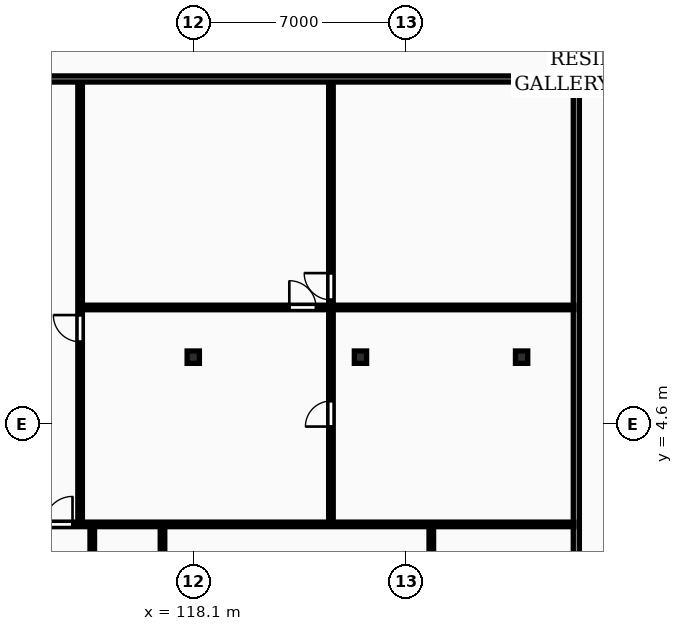
"""IFC4 building model, lengths in metres.
Left out: names, types, materials, properties, quantities, classifications, styles, units other than length and angle.
Written with IfcOpenShell. Run it as: python <this file> out.ifc"""

import sys

from ifc_helpers import new_model, si_unit, direction, frame, frame_2d, origin, origin_2d, place, context, subcontext, project, spatial, rectangle, i_section, extrude, element, fill, save


model = new_model("IFC4")
c1 = context("Model", 3, precision=1e-05, world=origin(), true_north=direction((0.0, 1.0)))
c2 = subcontext(c1, "Body", "Model", "MODEL_VIEW")
j1 = project(units=[si_unit("LENGTHUNIT", "METRE"), si_unit("PLANEANGLEUNIT", "RADIAN")], contexts=[c1])
p1 = place(None, origin())
s1 = spatial("IfcSite", under=j1, at=p1, CompositionType="ELEMENT")
p2 = place(p1, origin())
s2 = spatial("IfcBuilding", under=s1, at=p2, CompositionType="ELEMENT")
p3 = place(p2, frame((0.0, 0.0, 146.5)))
s3 = spatial("IfcBuildingStorey", under=s2, at=p3, CompositionType="ELEMENT", Elevation=146.5)
for number, where, z_axis, x_axis in (
    (1, (118.1, 6.8, 0.0), (0.0, 0.0, 1.0), (1.0, 0.0, 0.0)),
    (2, (123.6, 6.8, 0.0), (0.0, 0.0, 1.0), (1.0, 0.0, 0.0)),
    (3, (128.9, 6.8, 0.0), (0.0, 0.0, 1.0), (1.0, 0.0, 0.0)),
):
    element("IfcColumn", number, at=place(p3, frame(where, z_axis=z_axis, x_axis=x_axis)), inside=s3, PredefinedType="COLUMN", context=c2, shape_type="SweptSolid", body=[
        extrude(i_section(OverallWidth=0.403, OverallDepth=0.406, WebThickness=0.027, FlangeThickness=0.043, FilletRadius=0.015, at=origin_2d()), origin(), (0.0, 0.0, 1.0), 3.6),
    ])
p4 = place(p3, frame((130.7, -8.7, 0.0), z_axis=(0.0, 0.0, 1.0), x_axis=(0.0, 1.0, 0.0)))
e4 = element("IfcWall", 4, at=p4, inside=s3, PredefinedType="PARTITIONING", context=c2, shape_type="SweptSolid", body=[
    extrude(rectangle(XDim=24.57, YDim=0.2, at=frame_2d((12.285, 0.0))), origin(), (0.0, 0.0, 1.0), 3.31),
])
p5 = place(p3, frame((122.629, 1.34, 0.0), z_axis=(0.0, 0.0, 1.0), x_axis=(0.0, 1.0, 0.0)))
e5 = element("IfcWall", 5, at=p5, inside=s3, PredefinedType="PARTITIONING", context=c2, shape_type="SweptSolid", body=[
    extrude(rectangle(XDim=14.55, YDim=0.15, at=frame_2d((7.275, 0.0))), origin(), (0.0, 0.0, 1.0), 3.31),
])
p6 = place(p5, frame((3.177, 0.0, 0.0)))
e6 = element("IfcOpeningElement", 6, at=p6, cuts=e5, PredefinedType="OPENING", context=c2, shape_type="SweptSolid", body=[
    extrude(rectangle(XDim=0.84, YDim=2.04, at=frame_2d((0.42, 1.02))), frame((0.0, 0.085, 0.0), z_axis=(0.0, -1.0, 0.0), x_axis=(1.0, 0.0, 0.0)), (0.0, 0.0, 1.0), 0.17),
])
p7 = place(p5, frame((7.345, 0.0, 0.0)))
e7 = element("IfcOpeningElement", 7, at=p7, cuts=e5, PredefinedType="OPENING", context=c2, shape_type="SweptSolid", body=[
    extrude(rectangle(XDim=0.88, YDim=2.06, at=frame_2d((0.44, 1.03))), frame((0.0, 0.085, 0.0), z_axis=(0.0, -1.0, 0.0), x_axis=(1.0, 0.0, 0.0)), (0.0, 0.0, 1.0), 0.17),
])
p8 = place(p3, frame((114.438, 8.435, 0.0), z_axis=(0.0, 0.0, 1.0), x_axis=(1.0, 0.0, 0.0)))
e8 = element("IfcWall", 8, at=p8, inside=s3, PredefinedType="PARTITIONING", context=c2, shape_type="SweptSolid", body=[
    extrude(rectangle(XDim=16.182, YDim=0.15, at=frame_2d((8.091, 0.0))), origin(), (0.0, 0.0, 1.0), 3.31),
])
p9 = place(p8, frame((6.821, 0.0, 0.0)))
e9 = element("IfcOpeningElement", 9, at=p9, cuts=e8, PredefinedType="OPENING", context=c2, shape_type="SweptSolid", body=[
    extrude(rectangle(XDim=0.88, YDim=2.06, at=frame_2d((0.44, 1.03))), frame((0.0, 0.085, 0.0), z_axis=(0.0, -1.0, 0.0), x_axis=(1.0, 0.0, 0.0)), (0.0, 0.0, 1.0), 0.17),
])
p10 = place(p3, frame((114.378, 1.34, 0.0), z_axis=(0.0, 0.0, 1.0), x_axis=(0.0, 1.0, 0.0)))
e10 = element("IfcWall", 10, at=p10, inside=s3, PredefinedType="PARTITIONING", context=c2, shape_type="SweptSolid", body=[
    extrude(rectangle(XDim=14.55, YDim=0.15, at=frame_2d((7.275, 0.0))), origin(), (0.0, 0.0, 1.0), 3.31),
])
p11 = place(p10, frame((5.965, 0.0, 0.0)))
e11 = element("IfcOpeningElement", 11, at=p11, cuts=e10, PredefinedType="OPENING", context=c2, shape_type="SweptSolid", body=[
    extrude(rectangle(XDim=0.88, YDim=2.06, at=frame_2d((0.44, 1.03))), frame((0.0, 0.085, 0.0), z_axis=(0.0, -1.0, 0.0), x_axis=(1.0, 0.0, 0.0)), (0.0, 0.0, 1.0), 0.17),
])
p12 = place(p3, frame((117.088, -1.43, 0.0), z_axis=(0.0, 0.0, 1.0), x_axis=(0.0, 1.0, 0.0)))
e12 = element("IfcWall", 12, at=p12, inside=s3, PredefinedType="PARTITIONING", context=c2, shape_type="SweptSolid", body=[
    extrude(rectangle(XDim=2.69, YDim=0.15, at=frame_2d((1.345, 0.0))), origin(), (0.0, 0.0, 1.0), 3.31),
])
p13 = place(p3, frame((114.778, -8.7, 0.0), z_axis=(0.0, 0.0, 1.0), x_axis=(0.0, 1.0, 0.0)))
e13 = element("IfcWall", 13, at=p13, inside=s3, PredefinedType="PARTITIONING", context=c2, shape_type="SweptSolid", body=[
    extrude(rectangle(XDim=9.96, YDim=0.15, at=frame_2d((4.98, 0.0))), origin(), (0.0, 0.0, 1.0), 3.31),
])
p14 = place(p13, frame((5.22, 0.0, 0.0)))
e14 = element("IfcOpeningElement", 14, at=p14, cuts=e13, PredefinedType="OPENING", context=c2, shape_type="SweptSolid", body=[
    extrude(rectangle(XDim=0.92, YDim=2.08, at=frame_2d((0.46, 1.04))), frame((0.0, 0.085, 0.0), z_axis=(0.0, -1.0, 0.0), x_axis=(1.0, 0.0, 0.0)), (0.0, 0.0, 1.0), 0.17),
])
p15 = place(p3, frame((125.93, -1.43, 0.0), z_axis=(0.0, 0.0, 1.0), x_axis=(0.0, 1.0, 0.0)))
e15 = element("IfcWall", 15, at=p15, inside=s3, PredefinedType="PARTITIONING", context=c2, shape_type="SweptSolid", body=[
    extrude(rectangle(XDim=2.69, YDim=0.15, at=frame_2d((1.345, 0.0))), origin(), (0.0, 0.0, 1.0), 3.31),
])
p16 = place(p3, frame((110.488, 1.3, 0.0), z_axis=(0.0, 0.0, 1.0), x_axis=(1.0, 0.0, 0.0)))
e16 = element("IfcWall", 16, at=p16, inside=s3, PredefinedType="PARTITIONING", context=c2, shape_type="SweptSolid", body=[
    extrude(rectangle(XDim=20.132, YDim=0.15, at=frame_2d((10.066, 0.0))), origin(), (0.0, 0.0, 1.0), 3.31),
])
p17 = place(p16, frame((2.72, 0.0, 0.0)))
e17 = element("IfcOpeningElement", 17, at=p17, cuts=e16, PredefinedType="OPENING", context=c2, shape_type="SweptSolid", body=[
    extrude(rectangle(XDim=0.92, YDim=2.08, at=frame_2d((0.46, 1.04))), frame((0.0, 0.085, 0.0), z_axis=(0.0, -1.0, 0.0), x_axis=(1.0, 0.0, 0.0)), (0.0, 0.0, 1.0), 0.17),
])
p18 = place(p3, frame((72.7, 15.95, 0.0), z_axis=(0.0, 0.0, 1.0), x_axis=(1.0, 0.0, 0.0)))
e18 = element("IfcWall", 18, at=p18, inside=s3, PredefinedType="PARTITIONING", context=c2, shape_type="SweptSolid", body=[
    extrude(rectangle(XDim=58.0, YDim=0.2, at=frame_2d((29.0, 0.0))), origin(), (0.0, 0.0, 1.0), 3.31),
])
p19 = place(p18, frame((2.045, 0.0, 0.0)))
e19 = element("IfcOpeningElement", 19, at=p19, cuts=e18, PredefinedType="OPENING", context=c2, shape_type="SweptSolid", body=[
    extrude(rectangle(XDim=0.95, YDim=2.15, at=frame_2d((0.475, 1.075))), frame((0.0, 0.11, 0.0), z_axis=(0.0, -1.0, 0.0), x_axis=(1.0, 0.0, 0.0)), (0.0, 0.0, 1.0), 0.22),
])
p20 = place(p18, frame((24.295, 0.0, 0.0)))
e20 = element("IfcOpeningElement", 20, at=p20, cuts=e18, PredefinedType="OPENING", context=c2, shape_type="SweptSolid", body=[
    extrude(rectangle(XDim=0.95, YDim=2.15, at=frame_2d((0.475, 1.075))), frame((0.0, 0.11, 0.0), z_axis=(0.0, -1.0, 0.0), x_axis=(1.0, 0.0, 0.0)), (0.0, 0.0, 1.0), 0.22),
])
p21 = place(p18, frame((39.753, 0.0, 0.0)))
e21 = element("IfcOpeningElement", 21, at=p21, cuts=e18, PredefinedType="OPENING", context=c2, shape_type="SweptSolid", body=[
    extrude(rectangle(XDim=0.95, YDim=2.15, at=frame_2d((0.475, 1.075))), frame((0.0, 0.11, 0.0), z_axis=(0.0, -1.0, 0.0), x_axis=(1.0, 0.0, 0.0)), (0.0, 0.0, 1.0), 0.22),
])
p22 = place(p6, origin())
e22 = element("IfcDoor", 22, at=p22, inside=s3, OperationType="SINGLE_SWING_LEFT", PredefinedType="DOOR", context=c2, shape_type="SweptSolid", body=[
    extrude(rectangle(XDim=0.84, YDim=2.04, at=frame_2d((0.42, 1.02))), frame((0.0, 0.025, 0.0), z_axis=(0.0, -1.0, 0.0), x_axis=(1.0, 0.0, 0.0)), (0.0, 0.0, 1.0), 0.05),
])
fill(e6, e22)
p23 = place(p7, origin())
e23 = element("IfcDoor", 23, at=p23, inside=s3, OperationType="SINGLE_SWING_RIGHT", PredefinedType="DOOR", context=c2, shape_type="SweptSolid", body=[
    extrude(rectangle(XDim=0.88, YDim=2.06, at=frame_2d((0.44, 1.03))), frame((0.0, 0.025, 0.0), z_axis=(0.0, -1.0, 0.0), x_axis=(1.0, 0.0, 0.0)), (0.0, 0.0, 1.0), 0.05),
])
fill(e7, e23)
p24 = place(p9, origin())
e24 = element("IfcDoor", 24, at=p24, inside=s3, OperationType="SINGLE_SWING_LEFT", PredefinedType="DOOR", context=c2, shape_type="SweptSolid", body=[
    extrude(rectangle(XDim=0.88, YDim=2.06, at=frame_2d((0.44, 1.03))), frame((0.0, 0.025, 0.0), z_axis=(0.0, -1.0, 0.0), x_axis=(1.0, 0.0, 0.0)), (0.0, 0.0, 1.0), 0.05),
])
fill(e9, e24)
p25 = place(p11, origin())
e25 = element("IfcDoor", 25, at=p25, inside=s3, OperationType="SINGLE_SWING_RIGHT", PredefinedType="DOOR", context=c2, shape_type="SweptSolid", body=[
    extrude(rectangle(XDim=0.88, YDim=2.06, at=frame_2d((0.44, 1.03))), frame((0.0, 0.025, 0.0), z_axis=(0.0, -1.0, 0.0), x_axis=(1.0, 0.0, 0.0)), (0.0, 0.0, 1.0), 0.05),
])
fill(e11, e25)
p26 = place(p17, origin())
e26 = element("IfcDoor", 26, at=p26, inside=s3, OperationType="SINGLE_SWING_RIGHT", PredefinedType="DOOR", context=c2, shape_type="SweptSolid", body=[
    extrude(rectangle(XDim=0.92, YDim=2.08, at=frame_2d((0.46, 1.04))), frame((0.0, 0.025, 0.0), z_axis=(0.0, -1.0, 0.0), x_axis=(1.0, 0.0, 0.0)), (0.0, 0.0, 1.0), 0.05),
])
fill(e17, e26)
save(model, sys.argv[1])
